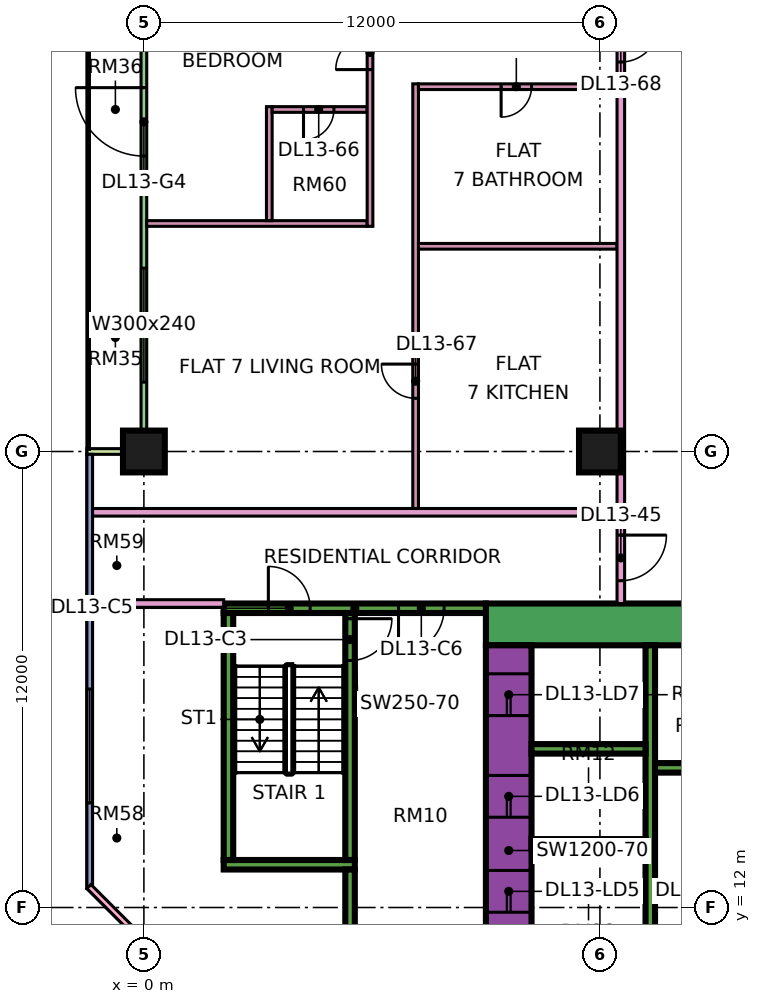
"""IFC4 building model, lengths in metres.
Left out: names, types, materials, properties, quantities, classifications, styles, units other than length and angle.
Written with IfcOpenShell. Run it as: python <this file> out.ifc"""

import sys

from ifc_helpers import new_model, si_unit, direction, frame, frame_2d, origin, origin_2d, place, context, subcontext, project, spatial, rectangle, extrude, element, fill, save


model = new_model("IFC4")
c1 = context("Model", 3, precision=1e-05, world=origin(), true_north=direction((0.0, 1.0)))
c2 = subcontext(c1, "Body", "Model", "MODEL_VIEW")
j1 = project(units=[si_unit("LENGTHUNIT", "METRE"), si_unit("PLANEANGLEUNIT", "RADIAN")], contexts=[c1])
p1 = place(None, origin())
s1 = spatial("IfcSite", under=j1, at=p1, CompositionType="ELEMENT")
p2 = place(p1, origin())
s2 = spatial("IfcBuilding", under=s1, at=p2, CompositionType="ELEMENT")
p3 = place(p2, frame((0.0, 0.0, 63.9)))
s3 = spatial("IfcBuildingStorey", under=s2, at=p3, CompositionType="ELEMENT", Elevation=63.9)
for number, where, z_axis, x_axis in (
    (1, (0.0, 24.0, 0.0), (0.0, 0.0, 1.0), (1.0, 0.0, 0.0)),
    (2, (12.0, 24.0, 0.0), (0.0, 0.0, 1.0), (1.0, 0.0, 0.0)),
):
    element("IfcColumn", number, at=place(p3, frame(where, z_axis=z_axis, x_axis=x_axis)), inside=s3, PredefinedType="COLUMN", context=c2, shape_type="SweptSolid", body=[
        extrude(rectangle(XDim=1.1, YDim=1.1, at=origin_2d()), origin(), (0.0, 0.0, 1.0), 3.75),
    ])
p4 = place(p3, frame((9.0, 19.45, 0.0), z_axis=(0.0, 0.0, 1.0), x_axis=(1.0, 0.0, 0.0)))
e3 = element("IfcWall", 3, at=p4, inside=s3, PredefinedType="SHEAR", context=c2, shape_type="SweptSolid", body=[
    extrude(rectangle(XDim=25.0, YDim=1.1, at=frame_2d((12.5, 0.0))), origin(), (0.0, 0.0, 1.0), 3.75),
])
p5 = place(p4, frame((19.1, 0.0, 0.0)))
e4 = element("IfcOpeningElement", 4, at=p5, cuts=e3, PredefinedType="OPENING", context=c2, shape_type="SweptSolid", body=[
    extrude(rectangle(XDim=1.8, YDim=2.4, at=frame_2d((0.9, 1.2))), frame((0.0, 0.56, 0.0), z_axis=(0.0, -1.0, 0.0), x_axis=(1.0, 0.0, 0.0)), (0.0, 0.0, 1.0), 1.12),
])
p6 = place(p3, frame((9.6, 8.1, 0.0), z_axis=(0.0, 0.0, 1.0), x_axis=(0.0, 1.0, 0.0)))
e5 = element("IfcWall", 5, at=p6, inside=s3, PredefinedType="SHEAR", context=c2, shape_type="SweptSolid", body=[
    extrude(rectangle(XDim=10.8, YDim=1.2, at=frame_2d((5.4, 0.0))), origin(), (0.0, 0.0, 1.0), 3.75),
])
p7 = place(p6, frame((3.775, 0.0, 0.0)))
e6 = element("IfcOpeningElement", 6, at=p7, cuts=e5, PredefinedType="OPENING", context=c2, shape_type="SweptSolid", body=[
    extrude(rectangle(XDim=1.1, YDim=2.2, at=frame_2d((0.55, 1.1))), frame((0.0, 0.61, 0.0), z_axis=(0.0, -1.0, 0.0), x_axis=(1.0, 0.0, 0.0)), (0.0, 0.0, 1.0), 1.22),
])
p8 = place(p6, frame((6.275, 0.0, 0.0)))
e7 = element("IfcOpeningElement", 7, at=p8, cuts=e5, PredefinedType="OPENING", context=c2, shape_type="SweptSolid", body=[
    extrude(rectangle(XDim=1.1, YDim=2.2, at=frame_2d((0.55, 1.1))), frame((0.0, 0.61, 0.0), z_axis=(0.0, -1.0, 0.0), x_axis=(1.0, 0.0, 0.0)), (0.0, 0.0, 1.0), 1.22),
])
p9 = place(p6, frame((8.95, 0.0, 0.0)))
e8 = element("IfcOpeningElement", 8, at=p9, cuts=e5, PredefinedType="OPENING", context=c2, shape_type="SweptSolid", body=[
    extrude(rectangle(XDim=1.1, YDim=2.2, at=frame_2d((0.55, 1.1))), frame((0.0, 0.61, 0.0), z_axis=(0.0, -1.0, 0.0), x_axis=(1.0, 0.0, 0.0)), (0.0, 0.0, 1.0), 1.22),
])
p10 = place(p6, frame((1.45, 0.0, 0.0)))
e9 = element("IfcOpeningElement", 9, at=p10, cuts=e5, PredefinedType="OPENING", context=c2, shape_type="SweptSolid", body=[
    extrude(rectangle(XDim=0.9, YDim=2.1, at=frame_2d((0.45, 1.05))), frame((0.0, 0.61, 0.0), z_axis=(0.0, -1.0, 0.0), x_axis=(1.0, 0.0, 0.0)), (0.0, 0.0, 1.0), 1.22),
])
p11 = place(p3, frame((13.325, 8.1, 0.0), z_axis=(0.0, 0.0, 1.0), x_axis=(0.0, 1.0, 0.0)))
e10 = element("IfcWall", 10, at=p11, inside=s3, PredefinedType="SHEAR", context=c2, shape_type="SweptSolid", body=[
    extrude(rectangle(XDim=10.8, YDim=0.25, at=frame_2d((5.4, 0.0))), origin(), (0.0, 0.0, 1.0), 3.75),
])
p12 = place(p3, frame((13.45, 15.675, 0.0), z_axis=(0.0, 0.0, 1.0), x_axis=(1.0, 0.0, 0.0)))
e11 = element("IfcWall", 11, at=p12, inside=s3, PredefinedType="SHEAR", context=c2, shape_type="SweptSolid", body=[
    extrude(rectangle(XDim=13.75, YDim=0.25, at=frame_2d((6.875, 0.0))), origin(), (0.0, 0.0, 1.0), 3.75),
])
for number, where, z_axis, x_axis in (
    (12, (10.2, 13.675, 0.0), (0.0, 0.0, 1.0), (1.0, 0.0, 0.0)),
    (13, (10.2, 16.175, 0.0), (0.0, 0.0, 1.0), (1.0, 0.0, 0.0)),
):
    element("IfcWall", number, at=place(p3, frame(where, z_axis=z_axis, x_axis=x_axis)), inside=s3, PredefinedType="SHEAR", context=c2, shape_type="SweptSolid", body=[
        extrude(rectangle(XDim=3.0, YDim=0.25, at=frame_2d((1.5, 0.0))), origin(), (0.0, 0.0, 1.0), 3.75),
    ])
p13 = place(p3, frame((2.1, 19.875, 0.0), z_axis=(0.0, 0.0, 1.0), x_axis=(1.0, 0.0, 0.0)))
e14 = element("IfcWall", 14, at=p13, inside=s3, PredefinedType="SHEAR", context=c2, shape_type="SweptSolid", body=[
    extrude(rectangle(XDim=6.9, YDim=0.25, at=frame_2d((3.45, 0.0))), origin(), (0.0, 0.0, 1.0), 3.75),
])
p14 = place(p13, frame((1.175, 0.0, 0.0)))
e15 = element("IfcOpeningElement", 15, at=p14, cuts=e14, PredefinedType="OPENING", context=c2, shape_type="SweptSolid", body=[
    extrude(rectangle(XDim=1.1, YDim=2.2, at=frame_2d((0.55, 1.1))), frame((0.0, 0.135, 0.0), z_axis=(0.0, -1.0, 0.0), x_axis=(1.0, 0.0, 0.0)), (0.0, 0.0, 1.0), 0.27),
])
p15 = place(p13, frame((4.6, 0.0, 0.0)))
e16 = element("IfcOpeningElement", 16, at=p15, cuts=e14, PredefinedType="OPENING", context=c2, shape_type="SweptSolid", body=[
    extrude(rectangle(XDim=1.2, YDim=2.2, at=frame_2d((0.6, 1.1))), frame((0.0, 0.135, 0.0), z_axis=(0.0, -1.0, 0.0), x_axis=(1.0, 0.0, 0.0)), (0.0, 0.0, 1.0), 0.27),
])
p16 = place(p3, frame((2.1, 13.125, 0.0), z_axis=(0.0, 0.0, 1.0), x_axis=(1.0, 0.0, 0.0)))
e17 = element("IfcWall", 17, at=p16, inside=s3, PredefinedType="SHEAR", context=c2, shape_type="SweptSolid", body=[
    extrude(rectangle(XDim=3.45, YDim=0.25, at=frame_2d((1.725, 0.0))), origin(), (0.0, 0.0, 1.0), 3.75),
])
p17 = place(p3, frame((2.225, 13.25, 0.0), z_axis=(0.0, 0.0, 1.0), x_axis=(0.0, 1.0, 0.0)))
e18 = element("IfcWall", 18, at=p17, inside=s3, PredefinedType="SHEAR", context=c2, shape_type="SweptSolid", body=[
    extrude(rectangle(XDim=6.5, YDim=0.25, at=frame_2d((3.25, 0.0))), origin(), (0.0, 0.0, 1.0), 3.75),
])
p18 = place(p3, frame((5.425, 13.25, 0.0), z_axis=(0.0, 0.0, 1.0), x_axis=(0.0, 1.0, 0.0)))
e19 = element("IfcWall", 19, at=p18, inside=s3, PredefinedType="SHEAR", context=c2, shape_type="SweptSolid", body=[
    extrude(rectangle(XDim=6.5, YDim=0.25, at=frame_2d((3.25, 0.0))), origin(), (0.0, 0.0, 1.0), 3.75),
])
p19 = place(p18, frame((5.25, 0.0, 0.0)))
e20 = element("IfcOpeningElement", 20, at=p19, cuts=e19, PredefinedType="OPENING", context=c2, shape_type="SweptSolid", body=[
    extrude(rectangle(XDim=1.1, YDim=2.2, at=frame_2d((0.55, 1.1))), frame((0.0, 0.135, 0.0), z_axis=(0.0, -1.0, 0.0), x_axis=(1.0, 0.0, 0.0)), (0.0, 0.0, 1.0), 0.27),
])
p20 = place(p3, frame((5.425, 9.0, 0.0), z_axis=(0.0, 0.0, 1.0), x_axis=(0.0, 1.0, 0.0)))
e21 = element("IfcWall", 21, at=p20, inside=s3, PredefinedType="SHEAR", context=c2, shape_type="SweptSolid", body=[
    extrude(rectangle(XDim=4.0, YDim=0.25, at=frame_2d((2.0, 0.0))), origin(), (0.0, 0.0, 1.0), 3.75),
])
p21 = place(p3, frame((0.0, 35.925, 0.0), z_axis=(0.0, 0.0, 1.0), x_axis=(0.0, -1.0, 0.0)))
e22 = element("IfcWall", 22, at=p21, inside=s3, PredefinedType="SOLIDWALL", context=c2, shape_type="SweptSolid", body=[
    extrude(rectangle(XDim=11.85, YDim=0.15, at=frame_2d((5.925, 0.0))), origin(), (0.0, 0.0, 1.0), 3.35),
])
p22 = place(p21, frame((2.35, 0.0, 0.0)))
e23 = element("IfcOpeningElement", 23, at=p22, cuts=e22, PredefinedType="OPENING", context=c2, shape_type="SweptSolid", body=[
    extrude(rectangle(XDim=1.8, YDim=2.4, at=frame_2d((0.9, 1.2))), frame((0.0, 0.085, 0.0), z_axis=(0.0, -1.0, 0.0), x_axis=(1.0, 0.0, 0.0)), (0.0, 0.0, 1.0), 0.17),
])
p23 = place(p21, frame((7.1, 0.0, 0.45)))
e24 = element("IfcOpeningElement", 24, at=p23, cuts=e22, PredefinedType="OPENING", context=c2, shape_type="SweptSolid", body=[
    extrude(rectangle(XDim=3.0, YDim=2.4, at=frame_2d((1.5, 1.2))), frame((0.0, 0.085, 0.0), z_axis=(0.0, -1.0, 0.0), x_axis=(1.0, 0.0, 0.0)), (0.0, 0.0, 1.0), 0.17),
])
p24 = place(p3, frame((-1.5, 24.0, 0.0), z_axis=(0.0, 0.0, 1.0), x_axis=(1.0, 0.0, 0.0)))
e25 = element("IfcWall", 25, at=p24, inside=s3, PredefinedType="SOLIDWALL", context=c2, shape_type="SweptSolid", body=[
    extrude(rectangle(XDim=1.5, YDim=0.15, at=frame_2d((0.75, 0.0))), origin(), (0.0, 0.0, 1.0), 3.35),
])
p25 = place(p3, frame((-1.425, 23.925, 0.0), z_axis=(0.0, 0.0, 1.0), x_axis=(0.0, -1.0, 0.0)))
e26 = element("IfcWall", 26, at=p25, inside=s3, PredefinedType="SOLIDWALL", context=c2, shape_type="SweptSolid", body=[
    extrude(rectangle(XDim=11.425, YDim=0.15, at=frame_2d((5.712, 0.0))), origin(), (0.0, 0.0, 1.0), 3.35),
])
p26 = place(p25, frame((6.175, 0.0, 0.45)))
e27 = element("IfcOpeningElement", 27, at=p26, cuts=e26, PredefinedType="OPENING", context=c2, shape_type="SweptSolid", body=[
    extrude(rectangle(XDim=3.0, YDim=2.4, at=frame_2d((1.5, 1.2))), frame((0.0, 0.085, 0.0), z_axis=(0.0, -1.0, 0.0), x_axis=(1.0, 0.0, 0.0)), (0.0, 0.0, 1.0), 0.17),
])
p27 = place(p3, frame((-1.447, 12.553, 0.0), z_axis=(0.0, 0.0, 1.0), x_axis=(0.707106781187, -0.707106781187, 0.0)))
e28 = element("IfcWall", 28, at=p27, inside=s3, PredefinedType="SOLIDWALL", context=c2, shape_type="SweptSolid", body=[
    extrude(rectangle(XDim=19.799, YDim=0.15, at=frame_2d((9.899, 0.0))), origin(), (0.0, 0.0, 1.0), 3.35),
])
p28 = place(p27, frame((2.212, 0.0, 0.45)))
e29 = element("IfcOpeningElement", 29, at=p28, cuts=e28, PredefinedType="OPENING", context=c2, shape_type="SweptSolid", body=[
    extrude(rectangle(XDim=3.0, YDim=2.4, at=frame_2d((1.5, 1.2))), frame((0.0, 0.085, 0.0), z_axis=(0.0, -1.0, 0.0), x_axis=(1.0, 0.0, 0.0)), (0.0, 0.0, 1.0), 0.17),
])
p29 = place(p27, frame((10.216, 0.0, 0.45)))
e30 = element("IfcOpeningElement", 30, at=p29, cuts=e28, PredefinedType="OPENING", context=c2, shape_type="SweptSolid", body=[
    extrude(rectangle(XDim=3.0, YDim=2.4, at=frame_2d((1.5, 1.2))), frame((0.0, 0.085, 0.0), z_axis=(0.0, -1.0, 0.0), x_axis=(1.0, 0.0, 0.0)), (0.0, 0.0, 1.0), 0.17),
])
p30 = place(p3, frame((-1.35, 20.0, 0.0), z_axis=(0.0, 0.0, 1.0), x_axis=(1.0, 0.0, 0.0)))
e31 = element("IfcWall", 31, at=p30, inside=s3, PredefinedType="PARTITIONING", context=c2, shape_type="SweptSolid", body=[
    extrude(rectangle(XDim=3.45, YDim=0.2, at=frame_2d((1.725, 0.0))), origin(), (0.0, 0.0, 1.0), 3.35),
])
p31 = place(p3, frame((-1.35, 22.4, 0.0), z_axis=(0.0, 0.0, 1.0), x_axis=(1.0, 0.0, 0.0)))
e32 = element("IfcWall", 32, at=p31, inside=s3, PredefinedType="PARTITIONING", context=c2, shape_type="SweptSolid", body=[
    extrude(rectangle(XDim=13.8, YDim=0.2, at=frame_2d((6.9, 0.0))), origin(), (0.0, 0.0, 1.0), 3.35),
])
p32 = place(p3, frame((0.074, 30.0, 0.0), z_axis=(0.0, 0.0, 1.0), x_axis=(1.0, 0.0, 0.0)))
e33 = element("IfcWall", 33, at=p32, inside=s3, PredefinedType="PARTITIONING", context=c2, shape_type="SweptSolid", body=[
    extrude(rectangle(XDim=5.801, YDim=0.15, at=frame_2d((2.9, 0.0))), origin(), (0.0, 0.0, 1.0), 3.35),
])
p33 = place(p3, frame((3.3, 30.075, 0.0), z_axis=(0.0, 0.0, 1.0), x_axis=(0.0, 1.0, 0.0)))
e34 = element("IfcWall", 34, at=p33, inside=s3, PredefinedType="PARTITIONING", context=c2, shape_type="SweptSolid", body=[
    extrude(rectangle(XDim=3.0, YDim=0.15, at=frame_2d((1.5, 0.0))), origin(), (0.0, 0.0, 1.0), 3.35),
])
p34 = place(p3, frame((3.375, 33.0, 0.0), z_axis=(0.0, 0.0, 1.0), x_axis=(1.0, 0.0, 0.0)))
e35 = element("IfcWall", 35, at=p34, inside=s3, PredefinedType="PARTITIONING", context=c2, shape_type="SweptSolid", body=[
    extrude(rectangle(XDim=2.5, YDim=0.15, at=frame_2d((1.25, 0.0))), origin(), (0.0, 0.0, 1.0), 3.35),
])
p35 = place(p34, frame((0.825, 0.0, 0.0)))
e36 = element("IfcOpeningElement", 36, at=p35, cuts=e35, PredefinedType="OPENING", context=c2, shape_type="SweptSolid", body=[
    extrude(rectangle(XDim=0.8, YDim=2.1, at=frame_2d((0.4, 1.05))), frame((0.0, 0.085, 0.0), z_axis=(0.0, -1.0, 0.0), x_axis=(1.0, 0.0, 0.0)), (0.0, 0.0, 1.0), 0.17),
])
p36 = place(p3, frame((5.95, 29.925, 0.0), z_axis=(0.0, 0.0, 1.0), x_axis=(0.0, 1.0, 0.0)))
e37 = element("IfcWall", 37, at=p36, inside=s3, PredefinedType="PARTITIONING", context=c2, shape_type="SweptSolid", body=[
    extrude(rectangle(XDim=5.975, YDim=0.15, at=frame_2d((2.987, 0.0))), origin(), (0.0, 0.0, 1.0), 3.35),
])
p37 = place(p36, frame((4.125, 0.0, 0.0)))
e38 = element("IfcOpeningElement", 38, at=p37, cuts=e37, PredefinedType="OPENING", context=c2, shape_type="SweptSolid", body=[
    extrude(rectangle(XDim=0.9, YDim=2.1, at=frame_2d((0.45, 1.05))), frame((0.0, 0.085, 0.0), z_axis=(0.0, -1.0, 0.0), x_axis=(1.0, 0.0, 0.0)), (0.0, 0.0, 1.0), 0.17),
])
p38 = place(p3, frame((7.15, 22.5, 0.0), z_axis=(0.0, 0.0, 1.0), x_axis=(0.0, 1.0, 0.0)))
e39 = element("IfcWall", 39, at=p38, inside=s3, PredefinedType="PARTITIONING", context=c2, shape_type="SweptSolid", body=[
    extrude(rectangle(XDim=11.175, YDim=0.15, at=frame_2d((5.587, 0.0))), origin(), (0.0, 0.0, 1.0), 3.35),
])
p39 = place(p38, frame((2.9, 0.0, 0.0)))
e40 = element("IfcOpeningElement", 40, at=p39, cuts=e39, PredefinedType="OPENING", context=c2, shape_type="SweptSolid", body=[
    extrude(rectangle(XDim=0.9, YDim=2.1, at=frame_2d((0.45, 1.05))), frame((0.0, 0.085, 0.0), z_axis=(0.0, -1.0, 0.0), x_axis=(1.0, 0.0, 0.0)), (0.0, 0.0, 1.0), 0.17),
])
p40 = place(p3, frame((7.225, 29.4, 0.0), z_axis=(0.0, 0.0, 1.0), x_axis=(1.0, 0.0, 0.0)))
e41 = element("IfcWall", 41, at=p40, inside=s3, PredefinedType="PARTITIONING", context=c2, shape_type="SweptSolid", body=[
    extrude(rectangle(XDim=5.225, YDim=0.15, at=frame_2d((2.612, 0.0))), origin(), (0.0, 0.0, 1.0), 3.35),
])
p41 = place(p3, frame((7.225, 33.6, 0.0), z_axis=(0.0, 0.0, 1.0), x_axis=(1.0, 0.0, 0.0)))
e42 = element("IfcWall", 42, at=p41, inside=s3, PredefinedType="PARTITIONING", context=c2, shape_type="SweptSolid", body=[
    extrude(rectangle(XDim=5.225, YDim=0.15, at=frame_2d((2.612, 0.0))), origin(), (0.0, 0.0, 1.0), 3.35),
])
p42 = place(p41, frame((2.175, 0.0, 0.0)))
e43 = element("IfcOpeningElement", 43, at=p42, cuts=e42, PredefinedType="OPENING", context=c2, shape_type="SweptSolid", body=[
    extrude(rectangle(XDim=0.8, YDim=2.1, at=frame_2d((0.4, 1.05))), frame((0.0, 0.085, 0.0), z_axis=(0.0, -1.0, 0.0), x_axis=(1.0, 0.0, 0.0)), (0.0, 0.0, 1.0), 0.17),
])
p43 = place(p3, frame((12.55, 20.0, 0.0), z_axis=(0.0, 0.0, 1.0), x_axis=(0.0, 1.0, 0.0)))
e44 = element("IfcWall", 44, at=p43, inside=s3, PredefinedType="PARTITIONING", context=c2, shape_type="SweptSolid", body=[
    extrude(rectangle(XDim=43.0, YDim=0.2, at=frame_2d((21.5, 0.0))), origin(), (0.0, 0.0, 1.0), 3.35),
])
p44 = place(p43, frame((25.8, 0.0, 0.0)))
e45 = element("IfcOpeningElement", 45, at=p44, cuts=e44, PredefinedType="OPENING", context=c2, shape_type="SweptSolid", body=[
    extrude(rectangle(XDim=1.0, YDim=2.1, at=frame_2d((0.5, 1.05))), frame((0.0, 0.11, 0.0), z_axis=(0.0, -1.0, 0.0), x_axis=(1.0, 0.0, 0.0)), (0.0, 0.0, 1.0), 0.22),
])
p45 = place(p43, frame((0.6, 0.0, 0.0)))
e46 = element("IfcOpeningElement", 46, at=p45, cuts=e44, PredefinedType="OPENING", context=c2, shape_type="SweptSolid", body=[
    extrude(rectangle(XDim=1.2, YDim=2.1, at=frame_2d((0.6, 1.05))), frame((0.0, 0.11, 0.0), z_axis=(0.0, -1.0, 0.0), x_axis=(1.0, 0.0, 0.0)), (0.0, 0.0, 1.0), 0.22),
])
p46 = place(p43, frame((14.25, 0.0, 0.0)))
e47 = element("IfcOpeningElement", 47, at=p46, cuts=e44, PredefinedType="OPENING", context=c2, shape_type="SweptSolid", body=[
    extrude(rectangle(XDim=1.0, YDim=2.1, at=frame_2d((0.5, 1.05))), frame((0.0, 0.11, 0.0), z_axis=(0.0, -1.0, 0.0), x_axis=(1.0, 0.0, 0.0)), (0.0, 0.0, 1.0), 0.22),
])
p47 = place(p22, frame((1.8, 0.0, 0.0), z_axis=(0.0, 0.0, 1.0), x_axis=(-1.0, 0.0, 0.0)))
e48 = element("IfcDoor", 48, at=p47, inside=s3, OperationType="DOUBLE_DOOR_SINGLE_SWING", PredefinedType="DOOR", context=c2, shape_type="SweptSolid", body=[
    extrude(rectangle(XDim=1.8, YDim=2.4, at=frame_2d((0.9, 1.2))), frame((0.0, 0.025, 0.0), z_axis=(0.0, -1.0, 0.0), x_axis=(1.0, 0.0, 0.0)), (0.0, 0.0, 1.0), 0.05),
])
fill(e23, e48)
p48 = place(p23, origin())
e49 = element("IfcWindow", 49, at=p48, inside=s3, PartitioningType="SINGLE_PANEL", PredefinedType="WINDOW", context=c2, shape_type="SweptSolid", body=[
    extrude(rectangle(XDim=3.0, YDim=2.4, at=frame_2d((1.5, 1.2))), frame((0.0, 0.03, 0.0), z_axis=(0.0, -1.0, 0.0), x_axis=(1.0, 0.0, 0.0)), (0.0, 0.0, 1.0), 0.06),
])
fill(e24, e49)
p49 = place(p26, origin())
e50 = element("IfcWindow", 50, at=p49, inside=s3, PartitioningType="SINGLE_PANEL", PredefinedType="WINDOW", context=c2, shape_type="SweptSolid", body=[
    extrude(rectangle(XDim=3.0, YDim=2.4, at=frame_2d((1.5, 1.2))), frame((0.0, 0.03, 0.0), z_axis=(0.0, -1.0, 0.0), x_axis=(1.0, 0.0, 0.0)), (0.0, 0.0, 1.0), 0.06),
])
fill(e27, e50)
p50 = place(p7, origin())
e51 = element("IfcDoor", 51, at=p50, inside=s3, OperationType="DOUBLE_DOOR_SLIDING", PredefinedType="DOOR", context=c2, shape_type="SweptSolid", body=[
    extrude(rectangle(XDim=1.1, YDim=2.2, at=frame_2d((0.55, 1.1))), frame((0.0, 0.025, 0.0), z_axis=(0.0, -1.0, 0.0), x_axis=(1.0, 0.0, 0.0)), (0.0, 0.0, 1.0), 0.05),
])
fill(e6, e51)
p51 = place(p8, origin())
e52 = element("IfcDoor", 52, at=p51, inside=s3, OperationType="DOUBLE_DOOR_SLIDING", PredefinedType="DOOR", context=c2, shape_type="SweptSolid", body=[
    extrude(rectangle(XDim=1.1, YDim=2.2, at=frame_2d((0.55, 1.1))), frame((0.0, 0.025, 0.0), z_axis=(0.0, -1.0, 0.0), x_axis=(1.0, 0.0, 0.0)), (0.0, 0.0, 1.0), 0.05),
])
fill(e7, e52)
p52 = place(p9, origin())
e53 = element("IfcDoor", 53, at=p52, inside=s3, OperationType="DOUBLE_DOOR_SLIDING", PredefinedType="DOOR", context=c2, shape_type="SweptSolid", body=[
    extrude(rectangle(XDim=1.1, YDim=2.2, at=frame_2d((0.55, 1.1))), frame((0.0, 0.025, 0.0), z_axis=(0.0, -1.0, 0.0), x_axis=(1.0, 0.0, 0.0)), (0.0, 0.0, 1.0), 0.05),
])
fill(e8, e53)
p53 = place(p19, origin())
e54 = element("IfcDoor", 54, at=p53, inside=s3, OperationType="SINGLE_SWING_RIGHT", PredefinedType="DOOR", context=c2, shape_type="SweptSolid", body=[
    extrude(rectangle(XDim=1.1, YDim=2.2, at=frame_2d((0.55, 1.1))), frame((0.0, 0.025, 0.0), z_axis=(0.0, -1.0, 0.0), x_axis=(1.0, 0.0, 0.0)), (0.0, 0.0, 1.0), 0.05),
])
fill(e20, e54)
p54 = place(p14, origin())
e55 = element("IfcDoor", 55, at=p54, inside=s3, OperationType="SINGLE_SWING_LEFT", PredefinedType="DOOR", context=c2, shape_type="SweptSolid", body=[
    extrude(rectangle(XDim=1.1, YDim=2.2, at=frame_2d((0.55, 1.1))), frame((0.0, 0.025, 0.0), z_axis=(0.0, -1.0, 0.0), x_axis=(1.0, 0.0, 0.0)), (0.0, 0.0, 1.0), 0.05),
])
fill(e15, e55)
p55 = place(p15, frame((1.2, 0.0, 0.0), z_axis=(0.0, 0.0, 1.0), x_axis=(-1.0, 0.0, 0.0)))
e56 = element("IfcDoor", 56, at=p55, inside=s3, OperationType="SINGLE_SWING_LEFT", PredefinedType="DOOR", context=c2, shape_type="SweptSolid", body=[
    extrude(rectangle(XDim=1.2, YDim=2.2, at=frame_2d((0.6, 1.1))), frame((0.0, 0.025, 0.0), z_axis=(0.0, -1.0, 0.0), x_axis=(1.0, 0.0, 0.0)), (0.0, 0.0, 1.0), 0.05),
])
fill(e16, e56)
p56 = place(p45, origin())
e57 = element("IfcDoor", 57, at=p56, inside=s3, OperationType="SINGLE_SWING_RIGHT", PredefinedType="DOOR", context=c2, shape_type="SweptSolid", body=[
    extrude(rectangle(XDim=1.2, YDim=2.1, at=frame_2d((0.6, 1.05))), frame((0.0, 0.025, 0.0), z_axis=(0.0, -1.0, 0.0), x_axis=(1.0, 0.0, 0.0)), (0.0, 0.0, 1.0), 0.05),
])
fill(e46, e57)
p57 = place(p42, frame((0.8, 0.0, 0.0), z_axis=(0.0, 0.0, 1.0), x_axis=(-1.0, 0.0, 0.0)))
e58 = element("IfcDoor", 58, at=p57, inside=s3, OperationType="SINGLE_SWING_LEFT", PredefinedType="DOOR", context=c2, shape_type="SweptSolid", body=[
    extrude(rectangle(XDim=0.8, YDim=2.1, at=frame_2d((0.4, 1.05))), frame((0.0, 0.025, 0.0), z_axis=(0.0, -1.0, 0.0), x_axis=(1.0, 0.0, 0.0)), (0.0, 0.0, 1.0), 0.05),
])
fill(e43, e58)
p58 = place(p37, origin())
e59 = element("IfcDoor", 59, at=p58, inside=s3, OperationType="SINGLE_SWING_LEFT", PredefinedType="DOOR", context=c2, shape_type="SweptSolid", body=[
    extrude(rectangle(XDim=0.9, YDim=2.1, at=frame_2d((0.45, 1.05))), frame((0.0, 0.025, 0.0), z_axis=(0.0, -1.0, 0.0), x_axis=(1.0, 0.0, 0.0)), (0.0, 0.0, 1.0), 0.05),
])
fill(e38, e59)
p59 = place(p35, frame((0.8, 0.0, 0.0), z_axis=(0.0, 0.0, 1.0), x_axis=(-1.0, 0.0, 0.0)))
e60 = element("IfcDoor", 60, at=p59, inside=s3, OperationType="SINGLE_SWING_LEFT", PredefinedType="DOOR", context=c2, shape_type="SweptSolid", body=[
    extrude(rectangle(XDim=0.8, YDim=2.1, at=frame_2d((0.4, 1.05))), frame((0.0, 0.025, 0.0), z_axis=(0.0, -1.0, 0.0), x_axis=(1.0, 0.0, 0.0)), (0.0, 0.0, 1.0), 0.05),
])
fill(e36, e60)
p60 = place(p39, frame((0.9, 0.0, 0.0), z_axis=(0.0, 0.0, 1.0), x_axis=(-1.0, 0.0, 0.0)))
e61 = element("IfcDoor", 61, at=p60, inside=s3, OperationType="SINGLE_SWING_RIGHT", PredefinedType="DOOR", context=c2, shape_type="SweptSolid", body=[
    extrude(rectangle(XDim=0.9, YDim=2.1, at=frame_2d((0.45, 1.05))), frame((0.0, 0.025, 0.0), z_axis=(0.0, -1.0, 0.0), x_axis=(1.0, 0.0, 0.0)), (0.0, 0.0, 1.0), 0.05),
])
fill(e40, e61)
p61 = place(p46, origin())
e62 = element("IfcDoor", 62, at=p61, inside=s3, OperationType="SINGLE_SWING_RIGHT", PredefinedType="DOOR", context=c2, shape_type="SweptSolid", body=[
    extrude(rectangle(XDim=1.0, YDim=2.1, at=frame_2d((0.5, 1.05))), frame((0.0, 0.025, 0.0), z_axis=(0.0, -1.0, 0.0), x_axis=(1.0, 0.0, 0.0)), (0.0, 0.0, 1.0), 0.05),
])
fill(e47, e62)
save(model, sys.argv[1])
